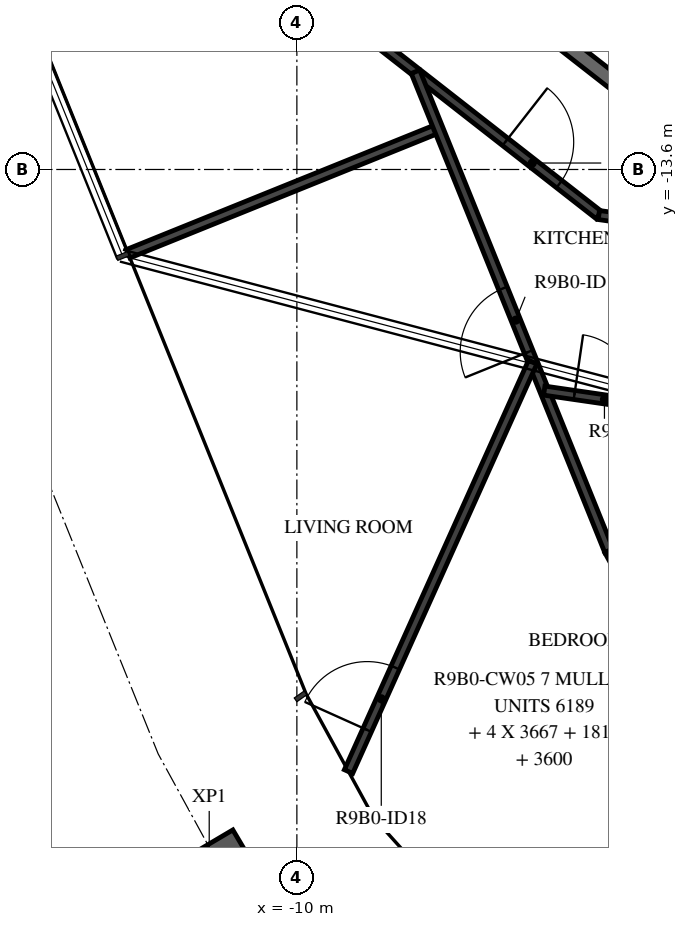
"""IFC4 building model, lengths in metres.
Left out: names, types, materials, properties, quantities, classifications, styles, units other than length and angle.
Written with IfcOpenShell. Run it as: python <this file> out.ifc"""

import sys

from ifc_helpers import new_model, si_unit, direction, frame, frame_2d, origin, origin_2d, place, context, subcontext, project, spatial, rectangle, i_section, extrude, element, fill, save


model = new_model("IFC4")
c1 = context("Model", 3, precision=1e-05, world=origin(), true_north=direction((0.0, 1.0)))
c2 = subcontext(c1, "Body", "Model", "MODEL_VIEW")
j1 = project(units=[si_unit("LENGTHUNIT", "METRE"), si_unit("PLANEANGLEUNIT", "RADIAN")], contexts=[c1])
p1 = place(None, origin())
s1 = spatial("IfcSite", under=j1, at=p1, CompositionType="ELEMENT")
p2 = place(p1, origin())
s2 = spatial("IfcBuilding", under=s1, at=p2, CompositionType="ELEMENT")
p3 = place(p2, frame((0.0, 0.0, 347.0)))
s3 = spatial("IfcBuildingStorey", under=s2, at=p3, CompositionType="ELEMENT", Elevation=347.0)
p4 = place(p3, frame((-11.153, -22.647, -0.38), z_axis=(0.0, 0.0, 1.0), x_axis=(-0.509114042361, 0.86069907161, 0.0)))
e1 = element("IfcColumn", 1, at=p4, inside=s3, PredefinedType="COLUMN", context=c2, shape_type="SweptSolid", body=[
    extrude(i_section(OverallWidth=0.3, OverallDepth=0.9, WebThickness=0.019, FlangeThickness=0.035, FilletRadius=0.03, at=origin_2d()), origin(), (0.0, 0.0, 1.0), 3.5),
])
p5 = place(p3, frame((-11.079, -8.349, 0.0), z_axis=(0.0, 0.0, 1.0), x_axis=(0.78800478687, -0.615669112324, 0.0)))
e2 = element("IfcWall", 2, at=p5, inside=s3, PredefinedType="STANDARD", context=c2, shape_type="SweptSolid", body=[
    extrude(rectangle(XDim=7.181, YDim=0.2, at=frame_2d((3.591, 0.0))), origin(), (0.0, 0.0, 1.0), 3.12),
])
p6 = place(p3, frame((-12.319, -9.283, 0.0), z_axis=(0.0, 0.0, 1.0), x_axis=(0.788000268464, -0.61567489546, 0.0)))
e3 = element("IfcWall", 3, at=p6, inside=s3, PredefinedType="PARTITIONING", context=c2, shape_type="SweptSolid", body=[
    extrude(rectangle(XDim=7.985, YDim=0.12, at=frame_2d((3.992, 0.0))), origin(), (0.0, 0.0, 1.0), 3.12),
])
p7 = place(p6, frame((6.423, 0.0, 0.0)))
e4 = element("IfcOpeningElement", 4, at=p7, cuts=e3, PredefinedType="OPENING", context=c2, shape_type="SweptSolid", body=[
    extrude(rectangle(XDim=0.9, YDim=2.1, at=frame_2d((0.45, 1.05))), frame((0.0, 0.07, 0.0), z_axis=(0.0, -1.0, 0.0), x_axis=(1.0, 0.0, 0.0)), (0.0, 0.0, 1.0), 0.14),
])
p8 = place(p3, frame((-6.027, -14.199, 0.0), z_axis=(0.0, 0.0, 1.0), x_axis=(0.990271617837, -0.139147845494, 0.0)))
e5 = element("IfcWall", 5, at=p8, inside=s3, PredefinedType="PARTITIONING", context=c2, shape_type="SweptSolid", body=[
    extrude(rectangle(XDim=7.308, YDim=0.12, at=frame_2d((3.654, 0.0))), origin(), (0.0, 0.0, 1.0), 3.12),
])
p9 = place(p8, frame((5.093, 0.0, 0.0)))
e6 = element("IfcOpeningElement", 6, at=p9, cuts=e5, PredefinedType="OPENING", context=c2, shape_type="SweptSolid", body=[
    extrude(rectangle(XDim=0.8, YDim=2.1, at=frame_2d((0.4, 1.05))), frame((0.0, 0.07, 0.0), z_axis=(0.0, -1.0, 0.0), x_axis=(1.0, 0.0, 0.0)), (0.0, 0.0, 1.0), 0.14),
])
p10 = place(p3, frame((-12.219, -14.708, 0.0), z_axis=(0.0, 0.0, 1.0), x_axis=(0.927189216671, 0.374593321469, 0.0)))
e7 = element("IfcWall", 7, at=p10, inside=s3, PredefinedType="PARTITIONING", context=c2, shape_type="SweptSolid", body=[
    extrude(rectangle(XDim=4.4, YDim=0.12, at=frame_2d((2.2, 0.0))), origin(), (0.0, 0.0, 1.0), 2.73),
])
p11 = place(p3, frame((-5.894, -18.616, 0.0), z_axis=(0.0, 0.0, 1.0), x_axis=(-0.374596683143, 0.927187858515, 0.0)))
e8 = element("IfcWall", 8, at=p11, inside=s3, PredefinedType="PARTITIONING", context=c2, shape_type="SweptSolid", body=[
    extrude(rectangle(XDim=6.796, YDim=0.12, at=frame_2d((3.398, 0.0))), origin(), (0.0, 0.0, 1.0), 3.12),
])
p12 = place(p11, frame((2.822, 0.0, 0.0)))
e9 = element("IfcOpeningElement", 9, at=p12, cuts=e8, PredefinedType="OPENING", context=c2, shape_type="SweptSolid", body=[
    extrude(rectangle(XDim=0.9, YDim=2.1, at=frame_2d((0.45, 1.05))), frame((0.0, 0.07, 0.0), z_axis=(0.0, -1.0, 0.0), x_axis=(1.0, 0.0, 0.0)), (0.0, 0.0, 1.0), 0.14),
])
p13 = place(p3, frame((-9.32, -21.521, 0.0), z_axis=(0.0, 0.0, 1.0), x_axis=(0.410206582363, 0.911992631432, 0.0)))
e10 = element("IfcWall", 10, at=p13, inside=s3, PredefinedType="PARTITIONING", context=c2, shape_type="SweptSolid", body=[
    extrude(rectangle(XDim=5.908, YDim=0.12, at=frame_2d((2.954, 0.0))), origin(), (0.0, 0.0, 1.0), 3.12),
])
p14 = place(p13, frame((0.6, 0.0, 0.0)))
e11 = element("IfcOpeningElement", 11, at=p14, cuts=e10, PredefinedType="OPENING", context=c2, shape_type="SweptSolid", body=[
    extrude(rectangle(XDim=0.9, YDim=2.1, at=frame_2d((0.45, 1.05))), frame((0.0, 0.07, 0.0), z_axis=(0.0, -1.0, 0.0), x_axis=(1.0, 0.0, 0.0)), (0.0, 0.0, 1.0), 0.14),
])
p15 = place(p3, frame((-6.745, -16.509, 0.0), z_axis=(0.0, 0.0, 1.0), x_axis=(0.989610924185, -0.143771411393, 0.0)))
e12 = element("IfcWall", 12, at=p15, inside=s3, PredefinedType="PARTITIONING", context=c2, shape_type="SweptSolid", body=[
    extrude(rectangle(XDim=2.865, YDim=0.12, at=frame_2d((1.432, 0.0))), origin(), (0.0, 0.0, 1.0), 3.12),
])
p16 = place(p15, frame((0.4, 0.0, 0.0)))
e13 = element("IfcOpeningElement", 13, at=p16, cuts=e12, PredefinedType="OPENING", context=c2, shape_type="SweptSolid", body=[
    extrude(rectangle(XDim=0.8, YDim=2.1, at=frame_2d((0.4, 1.05))), frame((0.0, 0.07, 0.0), z_axis=(0.0, -1.0, 0.0), x_axis=(1.0, 0.0, 0.0)), (0.0, 0.0, 1.0), 0.14),
])
p17 = place(p3, frame((-5.373, -19.57, 0.0), z_axis=(0.0, 0.0, 1.0), x_axis=(-0.479796131471, 0.87738000446, 0.0)))
e14 = element("IfcWall", 14, at=p17, inside=s3, PredefinedType="PARTITIONING", context=c2, shape_type="SweptSolid", body=[
    extrude(rectangle(XDim=1.087, YDim=0.12, at=frame_2d((0.543, 0.0))), origin(), (0.0, 0.0, 1.0), 3.12),
])
p18 = place(p7, origin())
e15 = element("IfcDoor", 15, at=p18, inside=s3, OperationType="SINGLE_SWING_RIGHT", PredefinedType="DOOR", context=c2, shape_type="SweptSolid", body=[
    extrude(rectangle(XDim=0.9, YDim=2.1, at=frame_2d((0.45, 1.05))), frame((0.0, 0.025, 0.0), z_axis=(0.0, -1.0, 0.0), x_axis=(1.0, 0.0, 0.0)), (0.0, 0.0, 1.0), 0.05),
])
fill(e4, e15)
p19 = place(p12, origin())
e16 = element("IfcDoor", 16, at=p19, inside=s3, OperationType="SINGLE_SWING_RIGHT", PredefinedType="DOOR", context=c2, shape_type="SweptSolid", body=[
    extrude(rectangle(XDim=0.9, YDim=2.1, at=frame_2d((0.45, 1.05))), frame((0.0, 0.025, 0.0), z_axis=(0.0, -1.0, 0.0), x_axis=(1.0, 0.0, 0.0)), (0.0, 0.0, 1.0), 0.05),
])
fill(e9, e16)
p20 = place(p14, origin())
e17 = element("IfcDoor", 17, at=p20, inside=s3, OperationType="SINGLE_SWING_RIGHT", PredefinedType="DOOR", context=c2, shape_type="SweptSolid", body=[
    extrude(rectangle(XDim=0.9, YDim=2.1, at=frame_2d((0.45, 1.05))), frame((0.0, 0.025, 0.0), z_axis=(0.0, -1.0, 0.0), x_axis=(1.0, 0.0, 0.0)), (0.0, 0.0, 1.0), 0.05),
])
fill(e11, e17)
p21 = place(p16, origin())
e18 = element("IfcDoor", 18, at=p21, inside=s3, OperationType="SINGLE_SWING_RIGHT", PredefinedType="DOOR", context=c2, shape_type="SweptSolid", body=[
    extrude(rectangle(XDim=0.8, YDim=2.1, at=frame_2d((0.4, 1.05))), frame((0.0, 0.025, 0.0), z_axis=(0.0, -1.0, 0.0), x_axis=(1.0, 0.0, 0.0)), (0.0, 0.0, 1.0), 0.05),
])
fill(e13, e18)
save(model, sys.argv[1])
